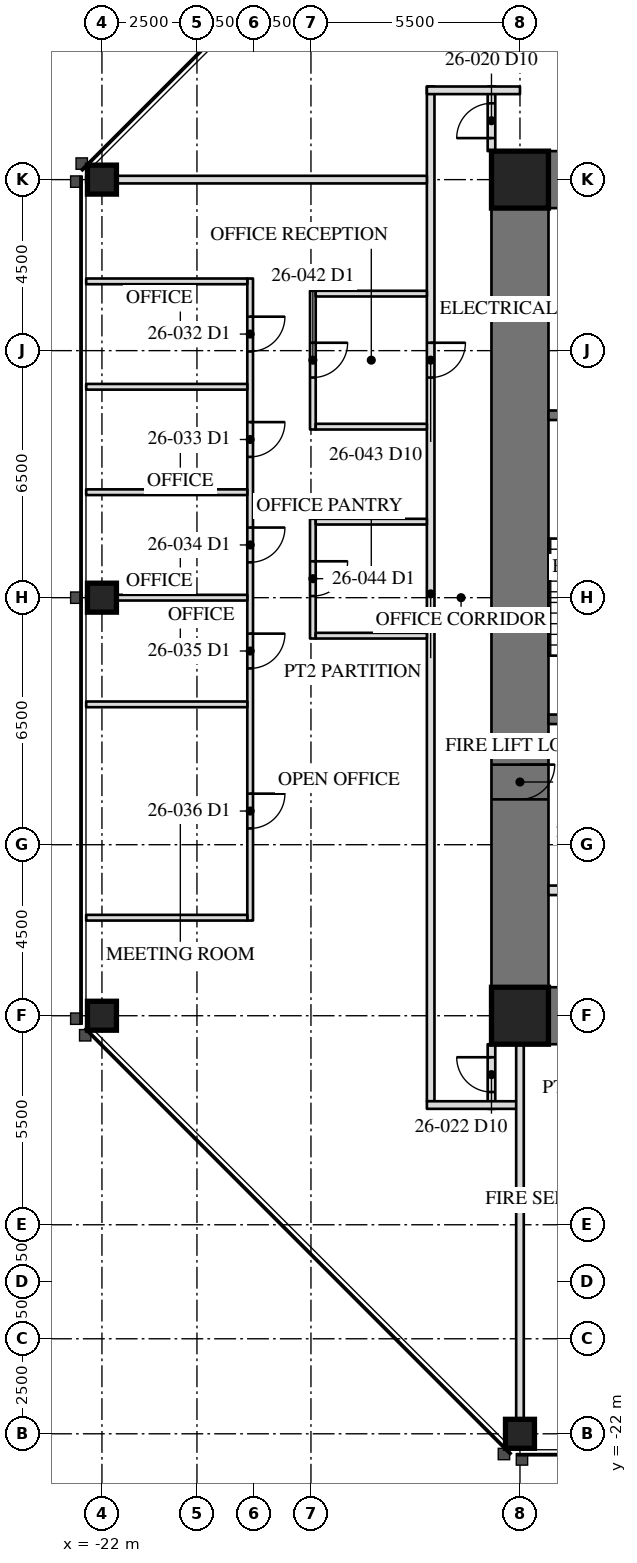
"""IFC4 building model, lengths in metres.
Left out: names, types, materials, properties, quantities, classifications, styles, units other than length and angle.
Written with IfcOpenShell. Run it as: python <this file> out.ifc"""

import sys

from ifc_helpers import new_model, si_unit, direction, frame, frame_2d, origin, origin_2d, place, context, subcontext, project, spatial, rectangle, hollow_rectangle, extrude, element, fill, save


model = new_model("IFC4")
c1 = context("Model", 3, precision=1e-05, world=origin(), true_north=direction((0.0, 1.0)))
c2 = subcontext(c1, "Body", "Model", "MODEL_VIEW")
j1 = project(units=[si_unit("LENGTHUNIT", "METRE"), si_unit("PLANEANGLEUNIT", "RADIAN")], contexts=[c1])
p1 = place(None, origin())
s1 = spatial("IfcSite", under=j1, at=p1, CompositionType="ELEMENT")
p2 = place(p1, origin())
s2 = spatial("IfcBuilding", under=s1, at=p2, CompositionType="ELEMENT")
p3 = place(p2, frame((0.0, 0.0, 113.1)))
s3 = spatial("IfcBuildingStorey", under=s2, at=p3, CompositionType="ELEMENT", Elevation=113.1)
for number, where, z_axis, x_axis in (
    (1, (-22.0, 0.0, 0.0), (0.0, 0.0, 1.0), (0.0, 1.0, 0.0)),
    (2, (-22.0, -11.0, 0.0), (0.0, 0.0, 1.0), (0.0, 1.0, 0.0)),
    (3, (-11.0, -22.0, 0.0), (0.0, 0.0, 1.0), (1.0, 0.0, 0.0)),
    (4, (-22.0, 11.0, 0.0), (0.0, 0.0, 1.0), (0.0, 1.0, 0.0)),
):
    element("IfcColumn", number, at=place(p3, frame(where, z_axis=z_axis, x_axis=x_axis)), inside=s3, PredefinedType="COLUMN", context=c2, shape_type="SweptSolid", body=[
        extrude(hollow_rectangle(XDim=0.762, YDim=0.762, WallThickness=0.127, at=origin_2d()), origin(), (0.0, 0.0, 1.0), 4.1),
    ])
p4 = place(p3, frame((-11.0, 11.0, 0.0), z_axis=(0.0, 0.0, 1.0), x_axis=(0.0, -1.0, 0.0)))
e5 = element("IfcWall", 5, at=p4, inside=s3, PredefinedType="SHEAR", context=c2, shape_type="SweptSolid", body=[
    extrude(rectangle(XDim=22.0, YDim=1.5, at=frame_2d((11.0, 0.0))), origin(), (0.0, 0.0, 1.0), 4.1),
])
p5 = place(p4, frame((15.393, 0.0, 0.0)))
e6 = element("IfcOpeningElement", 6, at=p5, cuts=e5, PredefinedType="OPENING", context=c2, shape_type="SweptSolid", body=[
    extrude(rectangle(XDim=0.915, YDim=2.134, at=frame_2d((0.458, 1.067))), frame((0.0, 0.76, 0.0), z_axis=(0.0, -1.0, 0.0), x_axis=(1.0, 0.0, 0.0)), (0.0, 0.0, 1.0), 1.52),
])
for number, where, z_axis, x_axis in (
    (7, (-6.5, 11.0, 0.0), (0.0, 0.0, 1.0), (-1.0, 0.0, 0.0)),
    (8, (-11.0, -11.0, 0.0), (0.0, 0.0, 1.0), (1.0, 0.0, 0.0)),
):
    element("IfcWall", number, at=place(p3, frame(where, z_axis=z_axis, x_axis=x_axis)), inside=s3, PredefinedType="SHEAR", context=c2, shape_type="SweptSolid", body=[
        extrude(rectangle(XDim=4.5, YDim=1.5, at=frame_2d((2.25, 0.0))), origin(), (0.0, 0.0, 1.0), 4.1),
    ])
for number, where, z_axis, x_axis in (
    (9, (-11.0, 11.0, 0.0), (0.0, 0.0, 1.0), (1.0, 0.0, 0.0)),
    (10, (-11.0, -11.0, 0.0), (0.0, 0.0, 1.0), (1.0, 0.0, 0.0)),
):
    element("IfcColumn", number, at=place(p3, frame(where, z_axis=z_axis, x_axis=x_axis)), inside=s3, PredefinedType="COLUMN", context=c2, shape_type="SweptSolid", body=[
        extrude(hollow_rectangle(XDim=1.499, YDim=1.499, WallThickness=0.102, at=origin_2d()), origin(), (0.0, 0.0, 1.0), 4.1),
    ])
p6 = place(p3, frame((-6.95, 4.8, 0.0), z_axis=(0.0, 0.0, 1.0), x_axis=(-1.0, 0.0, 0.0)))
e11 = element("IfcWall", 11, at=p6, inside=s3, PredefinedType="SOLIDWALL", context=c2, shape_type="SweptSolid", body=[
    extrude(rectangle(XDim=3.3, YDim=0.25, at=frame_2d((1.65, 0.0))), origin(), (0.0, 0.0, 1.0), 3.91),
])
p7 = place(p3, frame((-6.95, -3.2, 0.0), z_axis=(0.0, 0.0, 1.0), x_axis=(-1.0, 0.0, 0.0)))
e12 = element("IfcWall", 12, at=p7, inside=s3, PredefinedType="SOLIDWALL", context=c2, shape_type="SweptSolid", body=[
    extrude(rectangle(XDim=3.3, YDim=0.25, at=frame_2d((1.65, 0.0))), origin(), (0.0, 0.0, 1.0), 3.91),
])
p8 = place(p7, frame((1.116, 0.0, 0.0)))
e13 = element("IfcOpeningElement", 13, at=p8, cuts=e12, PredefinedType="OPENING", context=c2, shape_type="SweptSolid", body=[
    extrude(rectangle(XDim=1.067, YDim=2.134, at=frame_2d((0.533, 1.067))), frame((0.0, 0.135, 0.0), z_axis=(0.0, -1.0, 0.0), x_axis=(1.0, 0.0, 0.0)), (0.0, 0.0, 1.0), 0.27),
])
p9 = place(p3, frame((-6.95, -7.7, 0.0), z_axis=(0.0, 0.0, 1.0), x_axis=(-1.0, 0.0, 0.0)))
e14 = element("IfcWall", 14, at=p9, inside=s3, PredefinedType="PARTITIONING", context=c2, shape_type="SweptSolid", body=[
    extrude(rectangle(XDim=3.3, YDim=0.25, at=frame_2d((1.65, 0.0))), origin(), (0.0, 0.0, 1.0), 3.91),
])
p10 = place(p9, frame((0.45, 0.0, 0.0)))
e15 = element("IfcOpeningElement", 15, at=p10, cuts=e14, PredefinedType="OPENING", context=c2, shape_type="SweptSolid", body=[
    extrude(rectangle(XDim=1.219, YDim=2.134, at=frame_2d((0.609, 1.067))), frame((0.0, 0.135, 0.0), z_axis=(0.0, -1.0, 0.0), x_axis=(1.0, 0.0, 0.0)), (0.0, 0.0, 1.0), 0.27),
])
p11 = place(p3, frame((-13.35, 13.45, 0.0), z_axis=(0.0, 0.0, 1.0), x_axis=(0.0, -1.0, 0.0)))
e16 = element("IfcWall", 16, at=p11, inside=s3, PredefinedType="PARTITIONING", context=c2, shape_type="SweptSolid", body=[
    extrude(rectangle(XDim=26.7, YDim=0.2, at=frame_2d((13.35, 0.0))), origin(), (0.0, 0.0, 1.0), 3.91),
])
p12 = place(p11, frame((6.742, 0.0, 0.0)))
e17 = element("IfcOpeningElement", 17, at=p12, cuts=e16, PredefinedType="OPENING", context=c2, shape_type="SweptSolid", body=[
    extrude(rectangle(XDim=0.915, YDim=2.134, at=frame_2d((0.458, 1.067))), frame((0.0, 0.11, 0.0), z_axis=(0.0, -1.0, 0.0), x_axis=(1.0, 0.0, 0.0)), (0.0, 0.0, 1.0), 0.22),
])
p13 = place(p3, frame((-11.75, 11.75, 0.0), z_axis=(0.0, 0.0, 1.0), x_axis=(0.0, 1.0, 0.0)))
e18 = element("IfcWall", 18, at=p13, inside=s3, PredefinedType="PARTITIONING", context=c2, shape_type="SweptSolid", body=[
    extrude(rectangle(XDim=1.7, YDim=0.2, at=frame_2d((0.85, 0.0))), origin(), (0.0, 0.0, 1.0), 3.91),
])
p14 = place(p13, frame((0.343, 0.0, 0.0)))
e19 = element("IfcOpeningElement", 19, at=p14, cuts=e18, PredefinedType="OPENING", context=c2, shape_type="SweptSolid", body=[
    extrude(rectangle(XDim=0.915, YDim=2.134, at=frame_2d((0.458, 1.067))), frame((0.0, 0.11, 0.0), z_axis=(0.0, -1.0, 0.0), x_axis=(1.0, 0.0, 0.0)), (0.0, 0.0, 1.0), 0.22),
])
p15 = place(p3, frame((-11.0, 13.35, 0.0), z_axis=(0.0, 0.0, 1.0), x_axis=(-1.0, 0.0, 0.0)))
e20 = element("IfcWall", 20, at=p15, inside=s3, PredefinedType="PARTITIONING", context=c2, shape_type="SweptSolid", body=[
    extrude(rectangle(XDim=2.45, YDim=0.2, at=frame_2d((1.225, 0.0))), origin(), (0.0, 0.0, 1.0), 3.91),
])
p16 = place(p3, frame((-11.75, -11.75, 0.0), z_axis=(0.0, 0.0, 1.0), x_axis=(0.0, -1.0, 0.0)))
e21 = element("IfcWall", 21, at=p16, inside=s3, PredefinedType="PARTITIONING", context=c2, shape_type="SweptSolid", body=[
    extrude(rectangle(XDim=1.7, YDim=0.2, at=frame_2d((0.85, 0.0))), origin(), (0.0, 0.0, 1.0), 3.91),
])
p17 = place(p16, frame((0.343, 0.0, 0.0)))
e22 = element("IfcOpeningElement", 22, at=p17, cuts=e21, PredefinedType="OPENING", context=c2, shape_type="SweptSolid", body=[
    extrude(rectangle(XDim=0.915, YDim=2.134, at=frame_2d((0.458, 1.067))), frame((0.0, 0.11, 0.0), z_axis=(0.0, -1.0, 0.0), x_axis=(1.0, 0.0, 0.0)), (0.0, 0.0, 1.0), 0.22),
])
p18 = place(p3, frame((-11.0, -13.35, 0.0), z_axis=(0.0, 0.0, 1.0), x_axis=(-1.0, 0.0, 0.0)))
e23 = element("IfcWall", 23, at=p18, inside=s3, PredefinedType="PARTITIONING", context=c2, shape_type="SweptSolid", body=[
    extrude(rectangle(XDim=2.45, YDim=0.2, at=frame_2d((1.225, 0.0))), origin(), (0.0, 0.0, 1.0), 3.91),
])
p19 = place(p3, frame((-13.45, 11.0, 0.0), z_axis=(0.0, 0.0, 1.0), x_axis=(-1.0, 0.0, 0.0)))
e24 = element("IfcWall", 24, at=p19, inside=s3, PredefinedType="PARTITIONING", context=c2, shape_type="SweptSolid", body=[
    extrude(rectangle(XDim=8.965, YDim=0.2, at=frame_2d((4.482, 0.0))), origin(), (0.0, 0.0, 1.0), 3.326),
])
p20 = place(p3, frame((-11.0, -11.75, 0.0), z_axis=(0.0, 0.0, 1.0), x_axis=(0.0, -1.0, 0.0)))
e25 = element("IfcWall", 25, at=p20, inside=s3, PredefinedType="PARTITIONING", context=c2, shape_type="SweptSolid", body=[
    extrude(rectangle(XDim=10.665, YDim=0.2, at=frame_2d((5.333, 0.0))), origin(), (0.0, 0.0, 1.0), 3.326),
])
p21 = place(p3, frame((-18.1, 8.398, 0.0), z_axis=(0.0, 0.0, 1.0), x_axis=(0.0, -1.0, 0.0)))
e26 = element("IfcWall", 26, at=p21, inside=s3, PredefinedType="PARTITIONING", context=c2, shape_type="SweptSolid", body=[
    extrude(rectangle(XDim=16.894, YDim=0.15, at=frame_2d((8.447, 0.0))), origin(), (0.0, 0.0, 1.0), 3.91),
])
p22 = place(p21, frame((1.004, 0.0, 0.0)))
e27 = element("IfcOpeningElement", 27, at=p22, cuts=e26, PredefinedType="OPENING", context=c2, shape_type="SweptSolid", body=[
    extrude(rectangle(XDim=0.915, YDim=2.134, at=frame_2d((0.458, 1.067))), frame((0.0, 0.085, 0.0), z_axis=(0.0, -1.0, 0.0), x_axis=(1.0, 0.0, 0.0)), (0.0, 0.0, 1.0), 0.17),
])
p23 = place(p21, frame((3.779, 0.0, 0.0)))
e28 = element("IfcOpeningElement", 28, at=p23, cuts=e26, PredefinedType="OPENING", context=c2, shape_type="SweptSolid", body=[
    extrude(rectangle(XDim=0.915, YDim=2.134, at=frame_2d((0.458, 1.067))), frame((0.0, 0.085, 0.0), z_axis=(0.0, -1.0, 0.0), x_axis=(1.0, 0.0, 0.0)), (0.0, 0.0, 1.0), 0.17),
])
p24 = place(p21, frame((6.553, 0.0, 0.0)))
e29 = element("IfcOpeningElement", 29, at=p24, cuts=e26, PredefinedType="OPENING", context=c2, shape_type="SweptSolid", body=[
    extrude(rectangle(XDim=0.915, YDim=2.134, at=frame_2d((0.458, 1.067))), frame((0.0, 0.085, 0.0), z_axis=(0.0, -1.0, 0.0), x_axis=(1.0, 0.0, 0.0)), (0.0, 0.0, 1.0), 0.17),
])
p25 = place(p21, frame((9.344, 0.0, 0.0)))
e30 = element("IfcOpeningElement", 30, at=p25, cuts=e26, PredefinedType="OPENING", context=c2, shape_type="SweptSolid", body=[
    extrude(rectangle(XDim=0.915, YDim=2.134, at=frame_2d((0.458, 1.067))), frame((0.0, 0.085, 0.0), z_axis=(0.0, -1.0, 0.0), x_axis=(1.0, 0.0, 0.0)), (0.0, 0.0, 1.0), 0.17),
])
p26 = place(p21, frame((13.554, 0.0, 0.0)))
e31 = element("IfcOpeningElement", 31, at=p26, cuts=e26, PredefinedType="OPENING", context=c2, shape_type="SweptSolid", body=[
    extrude(rectangle(XDim=0.915, YDim=2.134, at=frame_2d((0.458, 1.067))), frame((0.0, 0.085, 0.0), z_axis=(0.0, -1.0, 0.0), x_axis=(1.0, 0.0, 0.0)), (0.0, 0.0, 1.0), 0.17),
])
for number, where, z_axis, x_axis in (
    (32, (-18.175, 8.323, 0.0), (0.0, 0.0, 1.0), (-1.0, 0.0, 0.0)),
    (33, (-18.175, 5.549, 0.0), (0.0, 0.0, 1.0), (-1.0, 0.0, 0.0)),
    (34, (-18.175, 2.775, 0.0), (0.0, 0.0, 1.0), (-1.0, 0.0, 0.0)),
):
    element("IfcWall", number, at=place(p3, frame(where, z_axis=z_axis, x_axis=x_axis)), inside=s3, PredefinedType="PARTITIONING", context=c2, shape_type="SweptSolid", body=[
        extrude(rectangle(XDim=4.24, YDim=0.15, at=frame_2d((2.12, 0.0))), origin(), (0.0, 0.0, 1.0), 3.91),
    ])
p27 = place(p3, frame((-18.175, 0.0, 0.0), z_axis=(0.0, 0.0, 1.0), x_axis=(-1.0, 0.0, 0.0)))
e35 = element("IfcWall", 35, at=p27, inside=s3, PredefinedType="PARTITIONING", context=c2, shape_type="SweptSolid", body=[
    extrude(rectangle(XDim=4.24, YDim=0.15, at=frame_2d((2.12, 0.0))), origin(), (0.0, 0.0, 1.0), 3.326),
])
for number, where, z_axis, x_axis in (
    (36, (-18.175, -2.807, 0.0), (0.0, 0.0, 1.0), (-1.0, 0.0, 0.0)),
    (37, (-18.175, -8.421, 0.0), (0.0, 0.0, 1.0), (-1.0, 0.0, 0.0)),
):
    element("IfcWall", number, at=place(p3, frame(where, z_axis=z_axis, x_axis=x_axis)), inside=s3, PredefinedType="PARTITIONING", context=c2, shape_type="SweptSolid", body=[
        extrude(rectangle(XDim=4.24, YDim=0.15, at=frame_2d((2.12, 0.0))), origin(), (0.0, 0.0, 1.0), 3.91),
    ])
p28 = place(p3, frame((-16.45, 8.075, 0.0), z_axis=(0.0, 0.0, 1.0), x_axis=(0.0, -1.0, 0.0)))
e38 = element("IfcWall", 38, at=p28, inside=s3, PredefinedType="PARTITIONING", context=c2, shape_type="SweptSolid", body=[
    extrude(rectangle(XDim=3.65, YDim=0.15, at=frame_2d((1.825, 0.0))), origin(), (0.0, 0.0, 1.0), 3.91),
])
p29 = place(p28, frame((1.367, 0.0, 0.0)))
e39 = element("IfcOpeningElement", 39, at=p29, cuts=e38, PredefinedType="OPENING", context=c2, shape_type="SweptSolid", body=[
    extrude(rectangle(XDim=0.915, YDim=2.134, at=frame_2d((0.458, 1.067))), frame((0.0, 0.085, 0.0), z_axis=(0.0, -1.0, 0.0), x_axis=(1.0, 0.0, 0.0)), (0.0, 0.0, 1.0), 0.17),
])
for number, where, z_axis, x_axis in (
    (40, (-16.375, 8.0, 0.0), (0.0, 0.0, 1.0), (1.0, 0.0, 0.0)),
    (41, (-16.375, 4.5, 0.0), (0.0, 0.0, 1.0), (1.0, 0.0, 0.0)),
):
    element("IfcWall", number, at=place(p3, frame(where, z_axis=z_axis, x_axis=x_axis)), inside=s3, PredefinedType="PARTITIONING", context=c2, shape_type="SweptSolid", body=[
        extrude(rectangle(XDim=2.925, YDim=0.15, at=frame_2d((1.462, 0.0))), origin(), (0.0, 0.0, 1.0), 3.91),
    ])
p30 = place(p3, frame((-16.45, 2.075, 0.0), z_axis=(0.0, 0.0, 1.0), x_axis=(0.0, -1.0, 0.0)))
e42 = element("IfcWall", 42, at=p30, inside=s3, PredefinedType="PARTITIONING", context=c2, shape_type="SweptSolid", body=[
    extrude(rectangle(XDim=3.15, YDim=0.15, at=frame_2d((1.575, 0.0))), origin(), (0.0, 0.0, 1.0), 3.91),
])
p31 = place(p30, frame((1.117, 0.0, 0.0)))
e43 = element("IfcOpeningElement", 43, at=p31, cuts=e42, PredefinedType="OPENING", context=c2, shape_type="SweptSolid", body=[
    extrude(rectangle(XDim=0.915, YDim=2.134, at=frame_2d((0.458, 1.067))), frame((0.0, 0.085, 0.0), z_axis=(0.0, -1.0, 0.0), x_axis=(1.0, 0.0, 0.0)), (0.0, 0.0, 1.0), 0.17),
])
for number, where, z_axis, x_axis in (
    (44, (-16.375, 2.0, 0.0), (0.0, 0.0, 1.0), (1.0, 0.0, 0.0)),
    (45, (-16.375, -1.0, 0.0), (0.0, 0.0, 1.0), (1.0, 0.0, 0.0)),
):
    element("IfcWall", number, at=place(p3, frame(where, z_axis=z_axis, x_axis=x_axis)), inside=s3, PredefinedType="PARTITIONING", context=c2, shape_type="SweptSolid", body=[
        extrude(rectangle(XDim=2.925, YDim=0.15, at=frame_2d((1.462, 0.0))), origin(), (0.0, 0.0, 1.0), 3.91),
    ])
p32 = place(p5, origin())
e46 = element("IfcDoor", 46, at=p32, inside=s3, OperationType="SINGLE_SWING_RIGHT", PredefinedType="DOOR", context=c2, shape_type="SweptSolid", body=[
    extrude(rectangle(XDim=0.915, YDim=2.134, at=frame_2d((0.458, 1.067))), frame((0.0, -0.675, 0.0), z_axis=(0.0, -1.0, 0.0), x_axis=(1.0, 0.0, 0.0)), (0.0, 0.0, 1.0), 0.05),
])
fill(e6, e46)
p33 = place(p14, origin())
e47 = element("IfcDoor", 47, at=p33, inside=s3, OperationType="SINGLE_SWING_LEFT", PredefinedType="DOOR", context=c2, shape_type="SweptSolid", body=[
    extrude(rectangle(XDim=0.915, YDim=2.134, at=frame_2d((0.458, 1.067))), frame((0.0, 0.025, 0.0), z_axis=(0.0, -1.0, 0.0), x_axis=(1.0, 0.0, 0.0)), (0.0, 0.0, 1.0), 0.05),
])
fill(e19, e47)
p34 = place(p17, frame((0.915, 0.0, 0.0), z_axis=(0.0, 0.0, 1.0), x_axis=(-1.0, 0.0, 0.0)))
e48 = element("IfcDoor", 48, at=p34, inside=s3, OperationType="SINGLE_SWING_LEFT", PredefinedType="DOOR", context=c2, shape_type="SweptSolid", body=[
    extrude(rectangle(XDim=0.915, YDim=2.134, at=frame_2d((0.458, 1.067))), frame((0.0, 0.025, 0.0), z_axis=(0.0, -1.0, 0.0), x_axis=(1.0, 0.0, 0.0)), (0.0, 0.0, 1.0), 0.05),
])
fill(e22, e48)
p35 = place(p22, origin())
e49 = element("IfcDoor", 49, at=p35, inside=s3, OperationType="SINGLE_SWING_LEFT", PredefinedType="DOOR", context=c2, shape_type="SweptSolid", body=[
    extrude(rectangle(XDim=0.915, YDim=2.134, at=frame_2d((0.458, 1.067))), frame((0.0, 0.025, 0.0), z_axis=(0.0, -1.0, 0.0), x_axis=(1.0, 0.0, 0.0)), (0.0, 0.0, 1.0), 0.05),
])
fill(e27, e49)
p36 = place(p23, origin())
e50 = element("IfcDoor", 50, at=p36, inside=s3, OperationType="SINGLE_SWING_LEFT", PredefinedType="DOOR", context=c2, shape_type="SweptSolid", body=[
    extrude(rectangle(XDim=0.915, YDim=2.134, at=frame_2d((0.458, 1.067))), frame((0.0, 0.025, 0.0), z_axis=(0.0, -1.0, 0.0), x_axis=(1.0, 0.0, 0.0)), (0.0, 0.0, 1.0), 0.05),
])
fill(e28, e50)
p37 = place(p24, origin())
e51 = element("IfcDoor", 51, at=p37, inside=s3, OperationType="SINGLE_SWING_LEFT", PredefinedType="DOOR", context=c2, shape_type="SweptSolid", body=[
    extrude(rectangle(XDim=0.915, YDim=2.134, at=frame_2d((0.458, 1.067))), frame((0.0, 0.025, 0.0), z_axis=(0.0, -1.0, 0.0), x_axis=(1.0, 0.0, 0.0)), (0.0, 0.0, 1.0), 0.05),
])
fill(e29, e51)
p38 = place(p25, origin())
e52 = element("IfcDoor", 52, at=p38, inside=s3, OperationType="SINGLE_SWING_LEFT", PredefinedType="DOOR", context=c2, shape_type="SweptSolid", body=[
    extrude(rectangle(XDim=0.915, YDim=2.134, at=frame_2d((0.458, 1.067))), frame((0.0, 0.025, 0.0), z_axis=(0.0, -1.0, 0.0), x_axis=(1.0, 0.0, 0.0)), (0.0, 0.0, 1.0), 0.05),
])
fill(e30, e52)
p39 = place(p26, origin())
e53 = element("IfcDoor", 53, at=p39, inside=s3, OperationType="SINGLE_SWING_LEFT", PredefinedType="DOOR", context=c2, shape_type="SweptSolid", body=[
    extrude(rectangle(XDim=0.915, YDim=2.134, at=frame_2d((0.458, 1.067))), frame((0.0, 0.025, 0.0), z_axis=(0.0, -1.0, 0.0), x_axis=(1.0, 0.0, 0.0)), (0.0, 0.0, 1.0), 0.05),
])
fill(e31, e53)
p40 = place(p29, origin())
e54 = element("IfcDoor", 54, at=p40, inside=s3, OperationType="SINGLE_SWING_LEFT", PredefinedType="DOOR", context=c2, shape_type="SweptSolid", body=[
    extrude(rectangle(XDim=0.915, YDim=2.134, at=frame_2d((0.458, 1.067))), frame((0.0, 0.025, 0.0), z_axis=(0.0, -1.0, 0.0), x_axis=(1.0, 0.0, 0.0)), (0.0, 0.0, 1.0), 0.05),
])
fill(e39, e54)
p41 = place(p12, origin())
e55 = element("IfcDoor", 55, at=p41, inside=s3, OperationType="SINGLE_SWING_LEFT", PredefinedType="DOOR", context=c2, shape_type="SweptSolid", body=[
    extrude(rectangle(XDim=0.915, YDim=2.134, at=frame_2d((0.458, 1.067))), frame((0.0, 0.025, 0.0), z_axis=(0.0, -1.0, 0.0), x_axis=(1.0, 0.0, 0.0)), (0.0, 0.0, 1.0), 0.05),
])
fill(e17, e55)
p42 = place(p31, origin())
e56 = element("IfcDoor", 56, at=p42, inside=s3, OperationType="SINGLE_SWING_LEFT", PredefinedType="DOOR", context=c2, shape_type="SweptSolid", body=[
    extrude(rectangle(XDim=0.915, YDim=2.134, at=frame_2d((0.458, 1.067))), frame((0.0, 0.025, 0.0), z_axis=(0.0, -1.0, 0.0), x_axis=(1.0, 0.0, 0.0)), (0.0, 0.0, 1.0), 0.05),
])
fill(e43, e56)
save(model, sys.argv[1])
